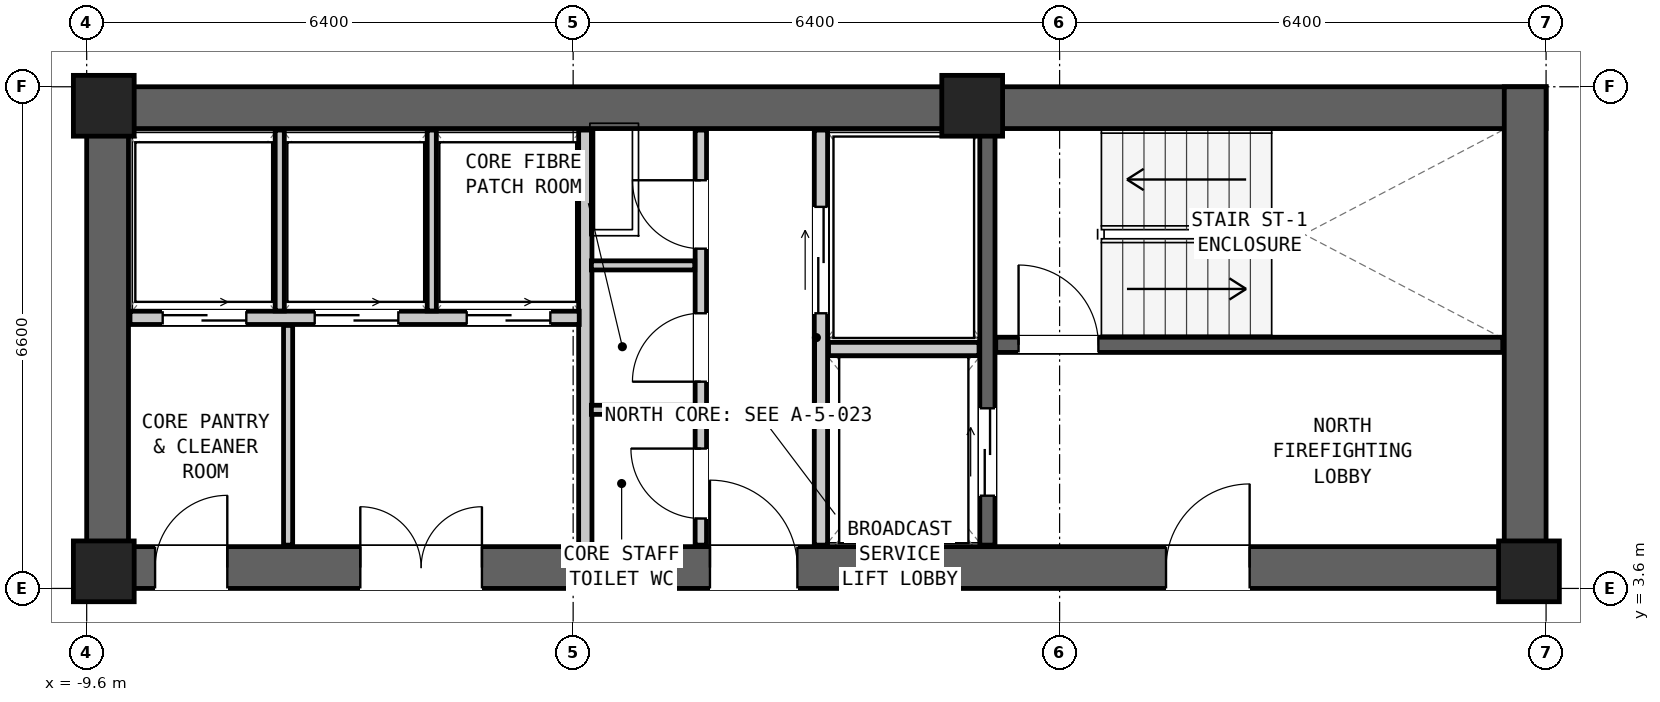
"""IFC4 building model, lengths in metres.
Left out: names, types, materials, properties, quantities, classifications, styles, units other than length and angle.
Written with IfcOpenShell. Run it as: python <this file> out.ifc"""

import sys

from ifc_helpers import new_model, si_unit, direction, frame, frame_2d, origin, origin_2d, place, context, subcontext, project, spatial, rectangle, extrude, element, fill, save


model = new_model("IFC4")
c1 = context("Model", 3, precision=1e-05, world=origin(), true_north=direction((0.0, 1.0)))
c2 = subcontext(c1, "Body", "Model", "MODEL_VIEW")
j1 = project(units=[si_unit("LENGTHUNIT", "METRE"), si_unit("PLANEANGLEUNIT", "RADIAN")], contexts=[c1])
p1 = place(None, origin())
s1 = spatial("IfcSite", under=j1, at=p1, CompositionType="ELEMENT")
p2 = place(p1, origin())
s2 = spatial("IfcBuilding", under=s1, at=p2, CompositionType="ELEMENT")
p3 = place(p2, frame((0.0, 0.0, 72.5)))
s3 = spatial("IfcBuildingStorey", under=s2, at=p3, CompositionType="ELEMENT", Elevation=72.5)
p4 = place(p3, frame((-9.6, 9.925, 0.0), z_axis=(0.0, 0.0, 1.0), x_axis=(1.0, 0.0, 0.0)))
e1 = element("IfcWall", 1, at=p4, inside=s3, PredefinedType="SHEAR", context=c2, shape_type="SweptSolid", body=[
    extrude(rectangle(XDim=19.2, YDim=0.55, at=frame_2d((9.6, 0.0))), origin(), (0.0, 0.0, 1.0), 3.05),
])
p5 = place(p3, frame((-9.6, 3.875, 0.0), z_axis=(0.0, 0.0, 1.0), x_axis=(1.0, 0.0, 0.0)))
e2 = element("IfcWall", 2, at=p5, inside=s3, PredefinedType="SHEAR", context=c2, shape_type="SweptSolid", body=[
    extrude(rectangle(XDim=19.2, YDim=0.55, at=frame_2d((9.6, 0.0))), origin(), (0.0, 0.0, 1.0), 3.05),
])
p6 = place(p5, frame((14.2, 0.0, 0.0)))
e3 = element("IfcOpeningElement", 3, at=p6, cuts=e2, PredefinedType="OPENING", context=c2, shape_type="SweptSolid", body=[
    extrude(rectangle(XDim=1.1, YDim=2.08, at=frame_2d((0.55, 1.04))), frame((0.0, 0.287, 0.0), z_axis=(0.0, -1.0, 0.0), x_axis=(1.0, 0.0, 0.0)), (0.0, 0.0, 1.0), 0.574),
])
p7 = place(p5, frame((8.2, 0.0, 0.0)))
e4 = element("IfcOpeningElement", 4, at=p7, cuts=e2, PredefinedType="OPENING", context=c2, shape_type="SweptSolid", body=[
    extrude(rectangle(XDim=1.15, YDim=2.1, at=frame_2d((0.575, 1.05))), frame((0.0, 0.287, 0.0), z_axis=(0.0, -1.0, 0.0), x_axis=(1.0, 0.0, 0.0)), (0.0, 0.0, 1.0), 0.574),
])
p8 = place(p5, frame((0.9, 0.0, 0.0)))
e5 = element("IfcOpeningElement", 5, at=p8, cuts=e2, PredefinedType="OPENING", context=c2, shape_type="SweptSolid", body=[
    extrude(rectangle(XDim=0.95, YDim=2.1, at=frame_2d((0.475, 1.05))), frame((0.0, 0.287, 0.0), z_axis=(0.0, -1.0, 0.0), x_axis=(1.0, 0.0, 0.0)), (0.0, 0.0, 1.0), 0.574),
])
p9 = place(p5, frame((3.6, 0.0, 0.0)))
e6 = element("IfcOpeningElement", 6, at=p9, cuts=e2, PredefinedType="OPENING", context=c2, shape_type="SweptSolid", body=[
    extrude(rectangle(XDim=1.6, YDim=2.12, at=frame_2d((0.8, 1.06))), frame((0.0, 0.287, 0.0), z_axis=(0.0, -1.0, 0.0), x_axis=(1.0, 0.0, 0.0)), (0.0, 0.0, 1.0), 0.574),
])
for number, where, z_axis, x_axis in (
    (7, (-9.325, 3.6, 0.0), (0.0, 0.0, 1.0), (0.0, 1.0, 0.0)),
    (8, (9.325, 3.6, 0.0), (0.0, 0.0, 1.0), (0.0, 1.0, 0.0)),
):
    element("IfcWall", number, at=place(p3, frame(where, z_axis=z_axis, x_axis=x_axis)), inside=s3, PredefinedType="SHEAR", context=c2, shape_type="SweptSolid", body=[
        extrude(rectangle(XDim=6.6, YDim=0.55, at=frame_2d((3.3, 0.0))), origin(), (0.0, 0.0, 1.0), 3.05),
    ])
for number, where, z_axis, x_axis in (
    (9, (-9.375, 9.95, 0.0), (0.0, 0.0, 1.0), (1.0, 0.0, 0.0)),
    (10, (2.05, 9.95, 0.0), (0.0, 0.0, 1.0), (1.0, 0.0, 0.0)),
    (11, (-9.375, 3.825, 0.0), (0.0, 0.0, 1.0), (1.0, 0.0, 0.0)),
    (12, (9.375, 3.825, 0.0), (0.0, 0.0, 1.0), (1.0, 0.0, 0.0)),
):
    element("IfcColumn", number, at=place(p3, frame(where, z_axis=z_axis, x_axis=x_axis)), inside=s3, PredefinedType="COLUMN", context=c2, shape_type="SweptSolid", body=[
        extrude(rectangle(XDim=0.8, YDim=0.8, at=origin_2d()), origin(), (0.0, 0.0, 1.0), 3.05),
    ])
p10 = place(p3, frame((2.36, 6.805, 0.0), z_axis=(0.0, 0.0, 1.0), x_axis=(1.0, 0.0, 0.0)))
e13 = element("IfcWall", 13, at=p10, inside=s3, PredefinedType="SHEAR", context=c2, shape_type="SweptSolid", body=[
    extrude(rectangle(XDim=6.67, YDim=0.2, at=frame_2d((3.335, 0.0))), origin(), (0.0, 0.0, 1.0), 2.83),
])
p11 = place(p10, frame((0.3, 0.0, 0.0)))
e14 = element("IfcOpeningElement", 14, at=p11, cuts=e13, PredefinedType="OPENING", context=c2, shape_type="SweptSolid", body=[
    extrude(rectangle(XDim=1.05, YDim=2.08, at=frame_2d((0.525, 1.04))), frame((0.0, 0.112, 0.0), z_axis=(0.0, -1.0, 0.0), x_axis=(1.0, 0.0, 0.0)), (0.0, 0.0, 1.0), 0.224),
])
p12 = place(p3, frame((2.25, 4.17, 0.0), z_axis=(0.0, 0.0, 1.0), x_axis=(0.0, 1.0, 0.0)))
e15 = element("IfcWall", 15, at=p12, inside=s3, PredefinedType="SHEAR", context=c2, shape_type="SweptSolid", body=[
    extrude(rectangle(XDim=5.46, YDim=0.2, at=frame_2d((2.73, 0.0))), origin(), (0.0, 0.0, 1.0), 2.83),
])
p13 = place(p12, frame((0.65, 0.0, 0.0)))
e16 = element("IfcOpeningElement", 16, at=p13, cuts=e15, PredefinedType="OPENING", context=c2, shape_type="SweptSolid", body=[
    extrude(rectangle(XDim=1.15, YDim=2.08, at=frame_2d((0.575, 1.04))), frame((0.0, 0.112, 0.0), z_axis=(0.0, -1.0, 0.0), x_axis=(1.0, 0.0, 0.0)), (0.0, 0.0, 1.0), 0.224),
])
p14 = place(p3, frame((0.06, 4.17, 0.0), z_axis=(0.0, 0.0, 1.0), x_axis=(0.0, 1.0, 0.0)))
e17 = element("IfcWall", 17, at=p14, inside=s3, PredefinedType="PARTITIONING", context=c2, shape_type="SweptSolid", body=[
    extrude(rectangle(XDim=5.46, YDim=0.175, at=frame_2d((2.73, 0.0))), origin(), (0.0, 0.0, 1.0), 2.83),
])
p15 = place(p14, frame((3.05, 0.0, 0.0)))
e18 = element("IfcOpeningElement", 18, at=p15, cuts=e17, PredefinedType="OPENING", context=c2, shape_type="SweptSolid", body=[
    extrude(rectangle(XDim=1.4, YDim=2.12, at=frame_2d((0.7, 1.06))), frame((0.0, 0.1, 0.0), z_axis=(0.0, -1.0, 0.0), x_axis=(1.0, 0.0, 0.0)), (0.0, 0.0, 1.0), 0.199),
])
p16 = place(p3, frame((0.16, 6.75, 0.0), z_axis=(0.0, 0.0, 1.0), x_axis=(1.0, 0.0, 0.0)))
e19 = element("IfcWall", 19, at=p16, inside=s3, PredefinedType="PARTITIONING", context=c2, shape_type="SweptSolid", body=[
    extrude(rectangle(XDim=1.98, YDim=0.175, at=frame_2d((0.99, 0.0))), origin(), (0.0, 0.0, 1.0), 2.83),
])
p17 = place(p3, frame((-3.04, 4.17, 0.0), z_axis=(0.0, 0.0, 1.0), x_axis=(0.0, 1.0, 0.0)))
e20 = element("IfcWall", 20, at=p17, inside=s3, PredefinedType="PARTITIONING", context=c2, shape_type="SweptSolid", body=[
    extrude(rectangle(XDim=5.46, YDim=0.175, at=frame_2d((2.73, 0.0))), origin(), (0.0, 0.0, 1.0), 2.83),
])
p18 = place(p3, frame((-1.52, 4.17, 0.0), z_axis=(0.0, 0.0, 1.0), x_axis=(0.0, 1.0, 0.0)))
e21 = element("IfcWall", 21, at=p18, inside=s3, PredefinedType="PARTITIONING", context=c2, shape_type="SweptSolid", body=[
    extrude(rectangle(XDim=5.46, YDim=0.15, at=frame_2d((2.73, 0.0))), origin(), (0.0, 0.0, 1.0), 2.83),
])
p19 = place(p18, frame((3.9, 0.0, 0.0)))
e22 = element("IfcOpeningElement", 22, at=p19, cuts=e21, PredefinedType="OPENING", context=c2, shape_type="SweptSolid", body=[
    extrude(rectangle(XDim=0.9, YDim=2.05, at=frame_2d((0.45, 1.025))), frame((0.0, 0.087, 0.0), z_axis=(0.0, -1.0, 0.0), x_axis=(1.0, 0.0, 0.0)), (0.0, 0.0, 1.0), 0.174),
])
p20 = place(p18, frame((2.15, 0.0, 0.0)))
e23 = element("IfcOpeningElement", 23, at=p20, cuts=e21, PredefinedType="OPENING", context=c2, shape_type="SweptSolid", body=[
    extrude(rectangle(XDim=0.9, YDim=2.05, at=frame_2d((0.45, 1.025))), frame((0.0, 0.087, 0.0), z_axis=(0.0, -1.0, 0.0), x_axis=(1.0, 0.0, 0.0)), (0.0, 0.0, 1.0), 0.174),
])
p21 = place(p18, frame((0.35, 0.0, 0.0)))
e24 = element("IfcOpeningElement", 24, at=p21, cuts=e21, PredefinedType="OPENING", context=c2, shape_type="SweptSolid", body=[
    extrude(rectangle(XDim=0.92, YDim=2.1, at=frame_2d((0.46, 1.05))), frame((0.0, 0.087, 0.0), z_axis=(0.0, -1.0, 0.0), x_axis=(1.0, 0.0, 0.0)), (0.0, 0.0, 1.0), 0.174),
])
for number, where, z_axis, x_axis in (
    (25, (-2.96, 5.95, 0.0), (0.0, 0.0, 1.0), (1.0, 0.0, 0.0)),
    (26, (-2.96, 7.85, 0.0), (0.0, 0.0, 1.0), (1.0, 0.0, 0.0)),
):
    element("IfcWall", number, at=place(p3, frame(where, z_axis=z_axis, x_axis=x_axis)), inside=s3, PredefinedType="PARTITIONING", context=c2, shape_type="SweptSolid", body=[
        extrude(rectangle(XDim=1.36, YDim=0.12, at=frame_2d((0.68, 0.0))), origin(), (0.0, 0.0, 1.0), 2.83),
    ])
p22 = place(p3, frame((-9.03, 7.16, 0.0), z_axis=(0.0, 0.0, 1.0), x_axis=(1.0, 0.0, 0.0)))
e27 = element("IfcWall", 27, at=p22, inside=s3, PredefinedType="PARTITIONING", context=c2, shape_type="SweptSolid", body=[
    extrude(rectangle(XDim=5.91, YDim=0.175, at=frame_2d((2.955, 0.0))), origin(), (0.0, 0.0, 1.0), 2.83),
])
p23 = place(p22, frame((0.43, 0.0, 0.0)))
e28 = element("IfcOpeningElement", 28, at=p23, cuts=e27, PredefinedType="OPENING", context=c2, shape_type="SweptSolid", body=[
    extrude(rectangle(XDim=1.1, YDim=2.06, at=frame_2d((0.55, 1.03))), frame((0.0, 0.1, 0.0), z_axis=(0.0, -1.0, 0.0), x_axis=(1.0, 0.0, 0.0)), (0.0, 0.0, 1.0), 0.199),
])
p24 = place(p22, frame((2.43, 0.0, 0.0)))
e29 = element("IfcOpeningElement", 29, at=p24, cuts=e27, PredefinedType="OPENING", context=c2, shape_type="SweptSolid", body=[
    extrude(rectangle(XDim=1.1, YDim=2.06, at=frame_2d((0.55, 1.03))), frame((0.0, 0.1, 0.0), z_axis=(0.0, -1.0, 0.0), x_axis=(1.0, 0.0, 0.0)), (0.0, 0.0, 1.0), 0.199),
])
p25 = place(p22, frame((4.43, 0.0, 0.0)))
e30 = element("IfcOpeningElement", 30, at=p25, cuts=e27, PredefinedType="OPENING", context=c2, shape_type="SweptSolid", body=[
    extrude(rectangle(XDim=1.1, YDim=2.06, at=frame_2d((0.55, 1.03))), frame((0.0, 0.1, 0.0), z_axis=(0.0, -1.0, 0.0), x_axis=(1.0, 0.0, 0.0)), (0.0, 0.0, 1.0), 0.199),
])
for number, where, z_axis, x_axis in (
    (31, (-7.06, 7.25, 0.0), (0.0, 0.0, 1.0), (0.0, 1.0, 0.0)),
    (32, (-5.06, 7.25, 0.0), (0.0, 0.0, 1.0), (0.0, 1.0, 0.0)),
):
    element("IfcWall", number, at=place(p3, frame(where, z_axis=z_axis, x_axis=x_axis)), inside=s3, PredefinedType="PARTITIONING", context=c2, shape_type="SweptSolid", body=[
        extrude(rectangle(XDim=2.38, YDim=0.12, at=frame_2d((1.19, 0.0))), origin(), (0.0, 0.0, 1.0), 2.83),
    ])
p26 = place(p3, frame((-6.95, 4.17, 0.0), z_axis=(0.0, 0.0, 1.0), x_axis=(0.0, 1.0, 0.0)))
e33 = element("IfcWall", 33, at=p26, inside=s3, PredefinedType="PARTITIONING", context=c2, shape_type="SweptSolid", body=[
    extrude(rectangle(XDim=2.89, YDim=0.12, at=frame_2d((1.445, 0.0))), origin(), (0.0, 0.0, 1.0), 2.83),
])
p27 = place(p11, origin())
e34 = element("IfcDoor", 34, at=p27, inside=s3, OperationType="SINGLE_SWING_LEFT", PredefinedType="DOOR", context=c2, shape_type="SweptSolid", body=[
    extrude(rectangle(XDim=1.05, YDim=2.08, at=frame_2d((0.525, 1.04))), frame((0.0, 0.025, 0.0), z_axis=(0.0, -1.0, 0.0), x_axis=(1.0, 0.0, 0.0)), (0.0, 0.0, 1.0), 0.05),
])
fill(e14, e34)
p28 = place(p6, origin())
e35 = element("IfcDoor", 35, at=p28, inside=s3, OperationType="SINGLE_SWING_RIGHT", PredefinedType="DOOR", context=c2, shape_type="SweptSolid", body=[
    extrude(rectangle(XDim=1.1, YDim=2.08, at=frame_2d((0.55, 1.04))), frame((0.0, 0.025, 0.0), z_axis=(0.0, -1.0, 0.0), x_axis=(1.0, 0.0, 0.0)), (0.0, 0.0, 1.0), 0.05),
])
fill(e3, e35)
p29 = place(p13, origin())
e36 = element("IfcDoor", 36, at=p29, inside=s3, OperationType="DOUBLE_DOOR_SLIDING", PredefinedType="DOOR", context=c2, shape_type="SweptSolid", body=[
    extrude(rectangle(XDim=1.15, YDim=2.08, at=frame_2d((0.575, 1.04))), frame((0.0, 0.025, 0.0), z_axis=(0.0, -1.0, 0.0), x_axis=(1.0, 0.0, 0.0)), (0.0, 0.0, 1.0), 0.05),
])
fill(e16, e36)
p30 = place(p15, origin())
e37 = element("IfcDoor", 37, at=p30, inside=s3, OperationType="DOUBLE_DOOR_SLIDING", PredefinedType="DOOR", context=c2, shape_type="SweptSolid", body=[
    extrude(rectangle(XDim=1.4, YDim=2.12, at=frame_2d((0.7, 1.06))), frame((0.0, 0.025, 0.0), z_axis=(0.0, -1.0, 0.0), x_axis=(1.0, 0.0, 0.0)), (0.0, 0.0, 1.0), 0.05),
])
fill(e18, e37)
p31 = place(p7, origin())
e38 = element("IfcDoor", 38, at=p31, inside=s3, OperationType="SINGLE_SWING_LEFT", PredefinedType="DOOR", context=c2, shape_type="SweptSolid", body=[
    extrude(rectangle(XDim=1.15, YDim=2.1, at=frame_2d((0.575, 1.05))), frame((0.0, 0.025, 0.0), z_axis=(0.0, -1.0, 0.0), x_axis=(1.0, 0.0, 0.0)), (0.0, 0.0, 1.0), 0.05),
])
fill(e4, e38)
p32 = place(p19, origin())
e39 = element("IfcDoor", 39, at=p32, inside=s3, OperationType="SINGLE_SWING_RIGHT", PredefinedType="DOOR", context=c2, shape_type="SweptSolid", body=[
    extrude(rectangle(XDim=0.9, YDim=2.05, at=frame_2d((0.45, 1.025))), frame((0.0, 0.025, 0.0), z_axis=(0.0, -1.0, 0.0), x_axis=(1.0, 0.0, 0.0)), (0.0, 0.0, 1.0), 0.05),
])
fill(e22, e39)
p33 = place(p20, origin())
e40 = element("IfcDoor", 40, at=p33, inside=s3, OperationType="SINGLE_SWING_LEFT", PredefinedType="DOOR", context=c2, shape_type="SweptSolid", body=[
    extrude(rectangle(XDim=0.9, YDim=2.05, at=frame_2d((0.45, 1.025))), frame((0.0, 0.025, 0.0), z_axis=(0.0, -1.0, 0.0), x_axis=(1.0, 0.0, 0.0)), (0.0, 0.0, 1.0), 0.05),
])
fill(e23, e40)
p34 = place(p21, origin())
e41 = element("IfcDoor", 41, at=p34, inside=s3, OperationType="SINGLE_SWING_RIGHT", PredefinedType="DOOR", context=c2, shape_type="SweptSolid", body=[
    extrude(rectangle(XDim=0.92, YDim=2.1, at=frame_2d((0.46, 1.05))), frame((0.0, 0.025, 0.0), z_axis=(0.0, -1.0, 0.0), x_axis=(1.0, 0.0, 0.0)), (0.0, 0.0, 1.0), 0.05),
])
fill(e24, e41)
p35 = place(p23, origin())
e42 = element("IfcDoor", 42, at=p35, inside=s3, OperationType="DOUBLE_DOOR_SLIDING", PredefinedType="DOOR", context=c2, shape_type="SweptSolid", body=[
    extrude(rectangle(XDim=1.1, YDim=2.06, at=frame_2d((0.55, 1.03))), frame((0.0, 0.025, 0.0), z_axis=(0.0, -1.0, 0.0), x_axis=(1.0, 0.0, 0.0)), (0.0, 0.0, 1.0), 0.05),
])
fill(e28, e42)
p36 = place(p24, origin())
e43 = element("IfcDoor", 43, at=p36, inside=s3, OperationType="DOUBLE_DOOR_SLIDING", PredefinedType="DOOR", context=c2, shape_type="SweptSolid", body=[
    extrude(rectangle(XDim=1.1, YDim=2.06, at=frame_2d((0.55, 1.03))), frame((0.0, 0.025, 0.0), z_axis=(0.0, -1.0, 0.0), x_axis=(1.0, 0.0, 0.0)), (0.0, 0.0, 1.0), 0.05),
])
fill(e29, e43)
p37 = place(p25, origin())
e44 = element("IfcDoor", 44, at=p37, inside=s3, OperationType="DOUBLE_DOOR_SLIDING", PredefinedType="DOOR", context=c2, shape_type="SweptSolid", body=[
    extrude(rectangle(XDim=1.1, YDim=2.06, at=frame_2d((0.55, 1.03))), frame((0.0, 0.025, 0.0), z_axis=(0.0, -1.0, 0.0), x_axis=(1.0, 0.0, 0.0)), (0.0, 0.0, 1.0), 0.05),
])
fill(e30, e44)
p38 = place(p8, origin())
e45 = element("IfcDoor", 45, at=p38, inside=s3, OperationType="SINGLE_SWING_RIGHT", PredefinedType="DOOR", context=c2, shape_type="SweptSolid", body=[
    extrude(rectangle(XDim=0.95, YDim=2.1, at=frame_2d((0.475, 1.05))), frame((0.0, 0.025, 0.0), z_axis=(0.0, -1.0, 0.0), x_axis=(1.0, 0.0, 0.0)), (0.0, 0.0, 1.0), 0.05),
])
fill(e5, e45)
p39 = place(p9, origin())
e46 = element("IfcDoor", 46, at=p39, inside=s3, OperationType="DOUBLE_DOOR_SINGLE_SWING", PredefinedType="DOOR", context=c2, shape_type="SweptSolid", body=[
    extrude(rectangle(XDim=1.6, YDim=2.12, at=frame_2d((0.8, 1.06))), frame((0.0, 0.025, 0.0), z_axis=(0.0, -1.0, 0.0), x_axis=(1.0, 0.0, 0.0)), (0.0, 0.0, 1.0), 0.05),
])
fill(e6, e46)
save(model, sys.argv[1])
